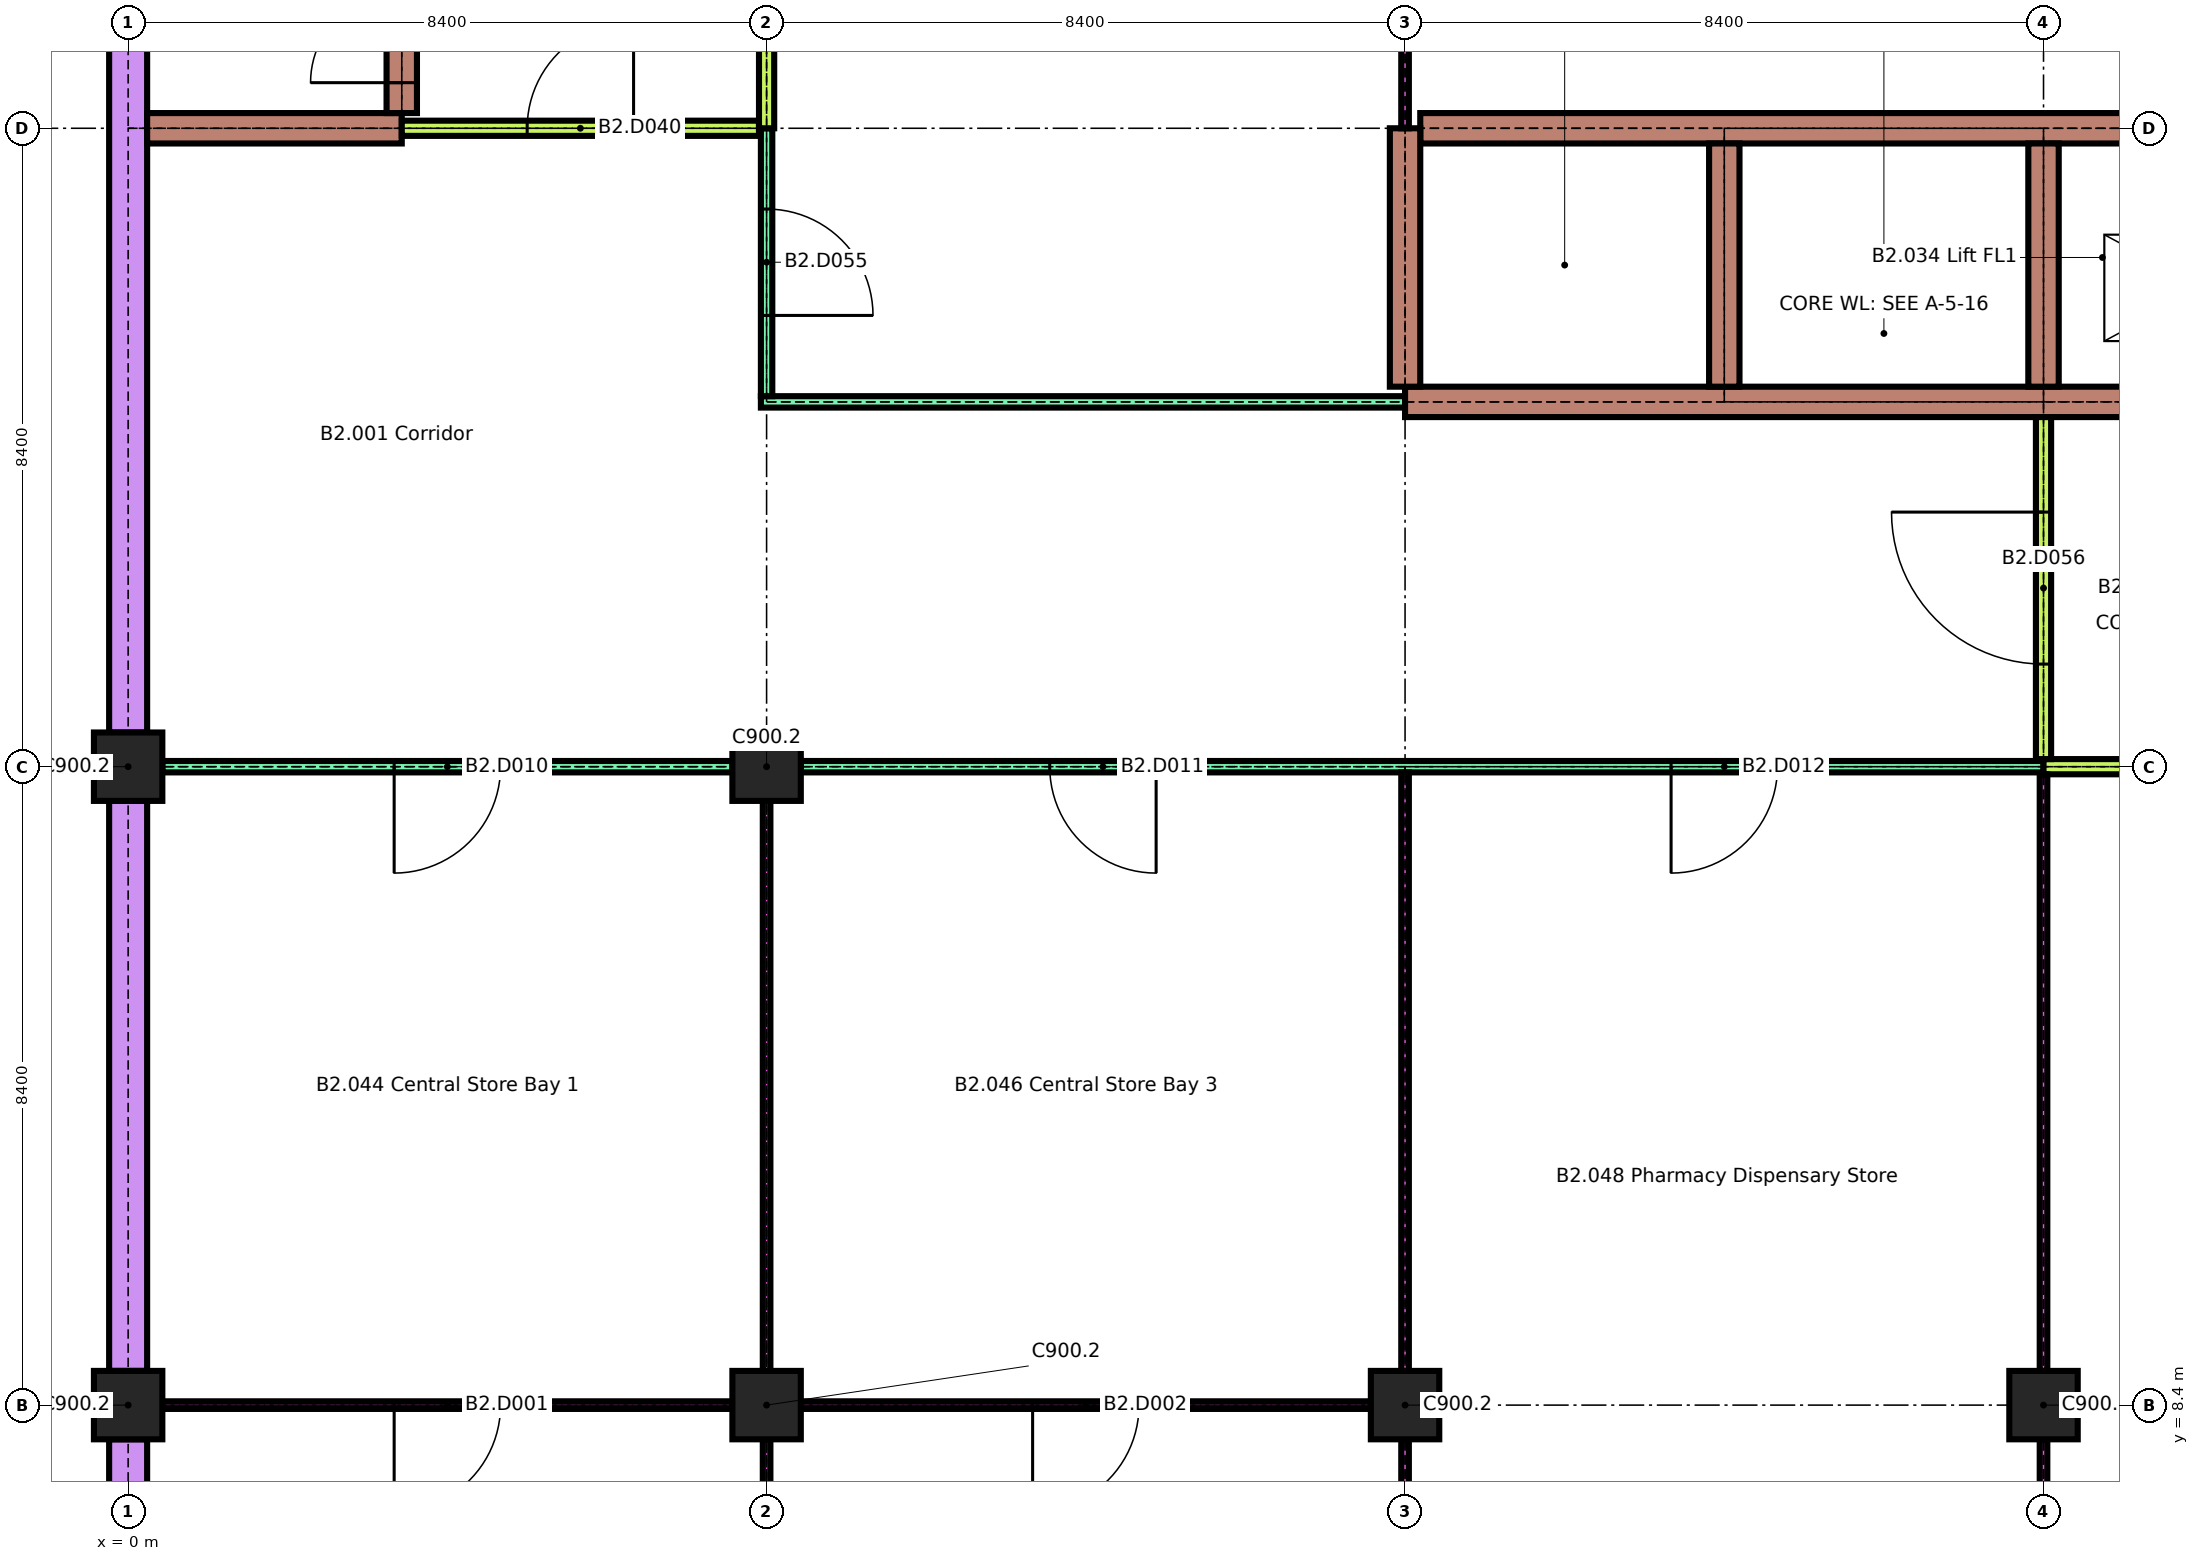
"""IFC4 building model, lengths in metres.
Left out: names, types, materials, properties, quantities, classifications, styles, units other than length and angle.
Written with IfcOpenShell. Run it as: python <this file> out.ifc"""

import sys

from ifc_helpers import new_model, si_unit, direction, frame, frame_2d, origin, origin_2d, place, context, subcontext, project, spatial, rectangle, extrude, element, fill, save


model = new_model("IFC4")
c1 = context("Model", 3, precision=1e-05, world=origin(), true_north=direction((0.0, 1.0)))
c2 = subcontext(c1, "Body", "Model", "MODEL_VIEW")
j1 = project(units=[si_unit("LENGTHUNIT", "METRE"), si_unit("PLANEANGLEUNIT", "RADIAN")], contexts=[c1])
p1 = place(None, origin())
s1 = spatial("IfcSite", under=j1, at=p1, CompositionType="ELEMENT")
p2 = place(p1, origin())
s2 = spatial("IfcBuilding", under=s1, at=p2, CompositionType="ELEMENT")
p3 = place(p2, frame((0.0, 0.0, -7.8)))
s3 = spatial("IfcBuildingStorey", under=s2, at=p3, CompositionType="ELEMENT", Elevation=-7.8)
for number, where, z_axis, x_axis in (
    (1, (0.0, 8.4, 0.0), (0.0, 0.0, 1.0), (1.0, 0.0, 0.0)),
    (2, (8.4, 8.4, 0.0), (0.0, 0.0, 1.0), (1.0, 0.0, 0.0)),
    (3, (16.8, 8.4, 0.0), (0.0, 0.0, 1.0), (1.0, 0.0, 0.0)),
    (4, (25.2, 8.4, 0.0), (0.0, 0.0, 1.0), (1.0, 0.0, 0.0)),
    (5, (0.0, 16.8, 0.0), (0.0, 0.0, 1.0), (1.0, 0.0, 0.0)),
    (6, (8.4, 16.8, 0.0), (0.0, 0.0, 1.0), (1.0, 0.0, 0.0)),
):
    element("IfcColumn", number, at=place(p3, frame(where, z_axis=z_axis, x_axis=x_axis)), inside=s3, PredefinedType="COLUMN", context=c2, shape_type="SweptSolid", body=[
        extrude(rectangle(XDim=0.9, YDim=0.9, at=origin_2d()), origin(), (0.0, 0.0, 1.0), 3.1),
    ])
for number, where, z_axis, x_axis in (
    (7, (0.0, 0.45, 0.0), (0.0, 0.0, 1.0), (0.0, 1.0, 0.0)),
    (8, (0.0, 8.85, 0.0), (0.0, 0.0, 1.0), (0.0, 1.0, 0.0)),
):
    element("IfcWall", number, at=place(p3, frame(where, z_axis=z_axis, x_axis=x_axis)), inside=s3, PredefinedType="SOLIDWALL", context=c2, shape_type="SweptSolid", body=[
        extrude(rectangle(XDim=7.5, YDim=0.5, at=frame_2d((3.75, 0.0))), origin(), (0.0, 0.0, 1.0), 3.1),
    ])
p4 = place(p3, frame((0.0, 17.25, 0.0), z_axis=(0.0, 0.0, 1.0), x_axis=(0.0, 1.0, 0.0)))
e9 = element("IfcWall", 9, at=p4, inside=s3, PredefinedType="SOLIDWALL", context=c2, shape_type="SweptSolid", body=[
    extrude(rectangle(XDim=16.6, YDim=0.5, at=frame_2d((8.3, 0.0))), origin(), (0.0, 0.0, 1.0), 3.1),
])
p5 = place(p3, frame((0.45, 8.4, 0.0), z_axis=(0.0, 0.0, 1.0), x_axis=(1.0, 0.0, 0.0)))
e10 = element("IfcWall", 10, at=p5, inside=s3, PredefinedType="PARTITIONING", context=c2, shape_type="SweptSolid", body=[
    extrude(rectangle(XDim=7.5, YDim=0.1, at=frame_2d((3.75, 0.0))), origin(), (0.0, 0.0, 1.0), 3.1),
])
p6 = place(p5, frame((3.05, 0.0, 0.0)))
e11 = element("IfcOpeningElement", 11, at=p6, cuts=e10, PredefinedType="OPENING", context=c2, shape_type="SweptSolid", body=[
    extrude(rectangle(XDim=1.4, YDim=2.1, at=frame_2d((0.7, 1.05))), frame((0.0, 0.06, 0.0), z_axis=(0.0, -1.0, 0.0), x_axis=(1.0, 0.0, 0.0)), (0.0, 0.0, 1.0), 0.12),
])
p7 = place(p3, frame((8.85, 8.4, 0.0), z_axis=(0.0, 0.0, 1.0), x_axis=(1.0, 0.0, 0.0)))
e12 = element("IfcWall", 12, at=p7, inside=s3, PredefinedType="PARTITIONING", context=c2, shape_type="SweptSolid", body=[
    extrude(rectangle(XDim=7.5, YDim=0.1, at=frame_2d((3.75, 0.0))), origin(), (0.0, 0.0, 1.0), 3.1),
])
p8 = place(p7, frame((3.05, 0.0, 0.0)))
e13 = element("IfcOpeningElement", 13, at=p8, cuts=e12, PredefinedType="OPENING", context=c2, shape_type="SweptSolid", body=[
    extrude(rectangle(XDim=1.4, YDim=2.1, at=frame_2d((0.7, 1.05))), frame((0.0, 0.06, 0.0), z_axis=(0.0, -1.0, 0.0), x_axis=(1.0, 0.0, 0.0)), (0.0, 0.0, 1.0), 0.12),
])
p9 = place(p3, frame((0.45, 16.8, 0.0), z_axis=(0.0, 0.0, 1.0), x_axis=(1.0, 0.0, 0.0)))
e14 = element("IfcWall", 14, at=p9, inside=s3, PredefinedType="PARTITIONING", context=c2, shape_type="SweptSolid", body=[
    extrude(rectangle(XDim=7.5, YDim=0.15, at=frame_2d((3.75, 0.0))), origin(), (0.0, 0.0, 1.0), 3.1),
])
p10 = place(p9, frame((3.05, 0.0, 0.0)))
e15 = element("IfcOpeningElement", 15, at=p10, cuts=e14, PredefinedType="OPENING", context=c2, shape_type="SweptSolid", body=[
    extrude(rectangle(XDim=1.4, YDim=2.1, at=frame_2d((0.7, 1.05))), frame((0.0, 0.085, 0.0), z_axis=(0.0, -1.0, 0.0), x_axis=(1.0, 0.0, 0.0)), (0.0, 0.0, 1.0), 0.17),
])
p11 = place(p3, frame((8.85, 16.8, 0.0), z_axis=(0.0, 0.0, 1.0), x_axis=(1.0, 0.0, 0.0)))
e16 = element("IfcWall", 16, at=p11, inside=s3, PredefinedType="PARTITIONING", context=c2, shape_type="SweptSolid", body=[
    extrude(rectangle(XDim=16.35, YDim=0.15, at=frame_2d((8.175, 0.0))), origin(), (0.0, 0.0, 1.0), 3.1),
])
p12 = place(p11, frame((3.275, 0.0, 0.0)))
e17 = element("IfcOpeningElement", 17, at=p12, cuts=e16, PredefinedType="OPENING", context=c2, shape_type="SweptSolid", body=[
    extrude(rectangle(XDim=1.4, YDim=2.1, at=frame_2d((0.7, 1.05))), frame((0.0, 0.085, 0.0), z_axis=(0.0, -1.0, 0.0), x_axis=(1.0, 0.0, 0.0)), (0.0, 0.0, 1.0), 0.17),
])
p13 = place(p11, frame((11.45, 0.0, 0.0)))
e18 = element("IfcOpeningElement", 18, at=p13, cuts=e16, PredefinedType="OPENING", context=c2, shape_type="SweptSolid", body=[
    extrude(rectangle(XDim=1.4, YDim=2.1, at=frame_2d((0.7, 1.05))), frame((0.0, 0.085, 0.0), z_axis=(0.0, -1.0, 0.0), x_axis=(1.0, 0.0, 0.0)), (0.0, 0.0, 1.0), 0.17),
])
p14 = place(p3, frame((25.2, 16.8, 0.0), z_axis=(0.0, 0.0, 1.0), x_axis=(1.0, 0.0, 0.0)))
e19 = element("IfcWall", 19, at=p14, inside=s3, PredefinedType="PARTITIONING", context=c2, shape_type="SweptSolid", body=[
    extrude(rectangle(XDim=4.2, YDim=0.2, at=frame_2d((2.1, 0.0))), origin(), (0.0, 0.0, 1.0), 3.1),
])
p15 = place(p3, frame((8.325, 21.6, 0.0), z_axis=(0.0, 0.0, 1.0), x_axis=(1.0, 0.0, 0.0)))
e20 = element("IfcWall", 20, at=p15, inside=s3, PredefinedType="PARTITIONING", context=c2, shape_type="SweptSolid", body=[
    extrude(rectangle(XDim=8.475, YDim=0.15, at=frame_2d((4.238, 0.0))), origin(), (0.0, 0.0, 1.0), 3.1),
])
p16 = place(p3, frame((16.8, 21.6, 0.0), z_axis=(0.0, 0.0, 1.0), x_axis=(1.0, 0.0, 0.0)))
e21 = element("IfcWall", 21, at=p16, inside=s3, PredefinedType="SHEAR", context=c2, shape_type="SweptSolid", body=[
    extrude(rectangle(XDim=12.6, YDim=0.4, at=frame_2d((6.3, 0.0))), origin(), (0.0, 0.0, 1.0), 3.1),
])
p17 = place(p16, frame((9.95, 0.0, 0.0)))
e22 = element("IfcOpeningElement", 22, at=p17, cuts=e21, PredefinedType="OPENING", context=c2, shape_type="SweptSolid", body=[
    extrude(rectangle(XDim=1.1, YDim=2.1, at=frame_2d((0.55, 1.05))), frame((0.0, 0.21, 0.0), z_axis=(0.0, -1.0, 0.0), x_axis=(1.0, 0.0, 0.0)), (0.0, 0.0, 1.0), 0.42),
])
p18 = place(p3, frame((0.25, 25.2, 0.0), z_axis=(0.0, 0.0, 1.0), x_axis=(1.0, 0.0, 0.0)))
e23 = element("IfcWall", 23, at=p18, inside=s3, PredefinedType="SHEAR", context=c2, shape_type="SweptSolid", body=[
    extrude(rectangle(XDim=3.35, YDim=0.4, at=frame_2d((1.675, 0.0))), origin(), (0.0, 0.0, 1.0), 3.1),
])
p19 = place(p3, frame((3.6, 25.2, 0.0), z_axis=(0.0, 0.0, 1.0), x_axis=(1.0, 0.0, 0.0)))
e24 = element("IfcWall", 24, at=p19, inside=s3, PredefinedType="PARTITIONING", context=c2, shape_type="SweptSolid", body=[
    extrude(rectangle(XDim=4.7, YDim=0.2, at=frame_2d((2.35, 0.0))), origin(), (0.0, 0.0, 1.0), 3.1),
])
p20 = place(p19, frame((1.65, 0.0, 0.0)))
e25 = element("IfcOpeningElement", 25, at=p20, cuts=e24, PredefinedType="OPENING", context=c2, shape_type="SweptSolid", body=[
    extrude(rectangle(XDim=1.4, YDim=2.1, at=frame_2d((0.7, 1.05))), frame((0.0, 0.11, 0.0), z_axis=(0.0, -1.0, 0.0), x_axis=(1.0, 0.0, 0.0)), (0.0, 0.0, 1.0), 0.22),
])
p21 = place(p3, frame((17.0, 25.2, 0.0), z_axis=(0.0, 0.0, 1.0), x_axis=(1.0, 0.0, 0.0)))
e26 = element("IfcWall", 26, at=p21, inside=s3, PredefinedType="SHEAR", context=c2, shape_type="SweptSolid", body=[
    extrude(rectangle(XDim=12.6, YDim=0.4, at=frame_2d((6.3, 0.0))), origin(), (0.0, 0.0, 1.0), 3.1),
])
p22 = place(p3, frame((3.6, 25.4, 0.0), z_axis=(0.0, 0.0, 1.0), x_axis=(0.0, 1.0, 0.0)))
e27 = element("IfcWall", 27, at=p22, inside=s3, PredefinedType="SHEAR", context=c2, shape_type="SweptSolid", body=[
    extrude(rectangle(XDim=7.95, YDim=0.4, at=frame_2d((3.975, 0.0))), origin(), (0.0, 0.0, 1.0), 3.1),
])
p23 = place(p22, frame((0.4, 0.0, 0.0)))
e28 = element("IfcOpeningElement", 28, at=p23, cuts=e27, PredefinedType="OPENING", context=c2, shape_type="SweptSolid", body=[
    extrude(rectangle(XDim=1.2, YDim=2.1, at=frame_2d((0.6, 1.05))), frame((0.0, 0.21, 0.0), z_axis=(0.0, -1.0, 0.0), x_axis=(1.0, 0.0, 0.0)), (0.0, 0.0, 1.0), 0.42),
])
for number, where, z_axis, x_axis in (
    (29, (8.4, 0.45, 0.0), (0.0, 0.0, 1.0), (0.0, 1.0, 0.0)),
    (30, (8.4, 8.85, 0.0), (0.0, 0.0, 1.0), (0.0, 1.0, 0.0)),
):
    element("IfcWall", number, at=place(p3, frame(where, z_axis=z_axis, x_axis=x_axis)), inside=s3, PredefinedType="PARTITIONING", context=c2, shape_type="SweptSolid", body=[
        extrude(rectangle(XDim=7.5, YDim=0.1, at=frame_2d((3.75, 0.0))), origin(), (0.0, 0.0, 1.0), 3.1),
    ])
p24 = place(p3, frame((8.4, 21.675, 0.0), z_axis=(0.0, 0.0, 1.0), x_axis=(0.0, 1.0, 0.0)))
e31 = element("IfcWall", 31, at=p24, inside=s3, PredefinedType="PARTITIONING", context=c2, shape_type="SweptSolid", body=[
    extrude(rectangle(XDim=3.525, YDim=0.15, at=frame_2d((1.762, 0.0))), origin(), (0.0, 0.0, 1.0), 3.1),
])
p25 = place(p24, frame((1.062, 0.0, 0.0)))
e32 = element("IfcOpeningElement", 32, at=p25, cuts=e31, PredefinedType="OPENING", context=c2, shape_type="SweptSolid", body=[
    extrude(rectangle(XDim=1.4, YDim=2.1, at=frame_2d((0.7, 1.05))), frame((0.0, 0.085, 0.0), z_axis=(0.0, -1.0, 0.0), x_axis=(1.0, 0.0, 0.0)), (0.0, 0.0, 1.0), 0.17),
])
p26 = place(p3, frame((8.4, 25.2, 0.0), z_axis=(0.0, 0.0, 1.0), x_axis=(0.0, 1.0, 0.0)))
e33 = element("IfcWall", 33, at=p26, inside=s3, PredefinedType="PARTITIONING", context=c2, shape_type="SweptSolid", body=[
    extrude(rectangle(XDim=8.15, YDim=0.2, at=frame_2d((4.075, 0.0))), origin(), (0.0, 0.0, 1.0), 3.1),
])
p27 = place(p3, frame((16.8, 0.45, 0.0), z_axis=(0.0, 0.0, 1.0), x_axis=(0.0, 1.0, 0.0)))
e34 = element("IfcWall", 34, at=p27, inside=s3, PredefinedType="PARTITIONING", context=c2, shape_type="SweptSolid", body=[
    extrude(rectangle(XDim=7.5, YDim=0.1, at=frame_2d((3.75, 0.0))), origin(), (0.0, 0.0, 1.0), 3.1),
])
p28 = place(p3, frame((16.8, 8.85, 0.0), z_axis=(0.0, 0.0, 1.0), x_axis=(0.0, 1.0, 0.0)))
e35 = element("IfcWall", 35, at=p28, inside=s3, PredefinedType="PARTITIONING", context=c2, shape_type="SweptSolid", body=[
    extrude(rectangle(XDim=7.875, YDim=0.1, at=frame_2d((3.938, 0.0))), origin(), (0.0, 0.0, 1.0), 3.1),
])
p29 = place(p3, frame((16.8, 21.8, 0.0), z_axis=(0.0, 0.0, 1.0), x_axis=(0.0, 1.0, 0.0)))
e36 = element("IfcWall", 36, at=p29, inside=s3, PredefinedType="SHEAR", context=c2, shape_type="SweptSolid", body=[
    extrude(rectangle(XDim=3.4, YDim=0.4, at=frame_2d((1.7, 0.0))), origin(), (0.0, 0.0, 1.0), 3.1),
])
p30 = place(p3, frame((16.8, 25.2, 0.0), z_axis=(0.0, 0.0, 1.0), x_axis=(0.0, 1.0, 0.0)))
e37 = element("IfcWall", 37, at=p30, inside=s3, PredefinedType="PARTITIONING", context=c2, shape_type="SweptSolid", body=[
    extrude(rectangle(XDim=7.95, YDim=0.1, at=frame_2d((3.975, 0.0))), origin(), (0.0, 0.0, 1.0), 3.1),
])
p31 = place(p3, frame((21.0, 21.8, 0.0), z_axis=(0.0, 0.0, 1.0), x_axis=(0.0, 1.0, 0.0)))
e38 = element("IfcWall", 38, at=p31, inside=s3, PredefinedType="SHEAR", context=c2, shape_type="SweptSolid", body=[
    extrude(rectangle(XDim=3.2, YDim=0.4, at=frame_2d((1.6, 0.0))), origin(), (0.0, 0.0, 1.0), 3.1),
])
p32 = place(p3, frame((25.2, 0.45, 0.0), z_axis=(0.0, 0.0, 1.0), x_axis=(0.0, 1.0, 0.0)))
e39 = element("IfcWall", 39, at=p32, inside=s3, PredefinedType="PARTITIONING", context=c2, shape_type="SweptSolid", body=[
    extrude(rectangle(XDim=7.5, YDim=0.1, at=frame_2d((3.75, 0.0))), origin(), (0.0, 0.0, 1.0), 3.1),
])
p33 = place(p3, frame((25.2, 8.85, 0.0), z_axis=(0.0, 0.0, 1.0), x_axis=(0.0, 1.0, 0.0)))
e40 = element("IfcWall", 40, at=p33, inside=s3, PredefinedType="PARTITIONING", context=c2, shape_type="SweptSolid", body=[
    extrude(rectangle(XDim=7.85, YDim=0.1, at=frame_2d((3.925, 0.0))), origin(), (0.0, 0.0, 1.0), 3.1),
])
p34 = place(p3, frame((25.2, 16.9, 0.0), z_axis=(0.0, 0.0, 1.0), x_axis=(0.0, 1.0, 0.0)))
e41 = element("IfcWall", 41, at=p34, inside=s3, PredefinedType="PARTITIONING", context=c2, shape_type="SweptSolid", body=[
    extrude(rectangle(XDim=4.5, YDim=0.2, at=frame_2d((2.25, 0.0))), origin(), (0.0, 0.0, 1.0), 3.1),
])
p35 = place(p34, frame((1.25, 0.0, 0.0)))
e42 = element("IfcOpeningElement", 42, at=p35, cuts=e41, PredefinedType="OPENING", context=c2, shape_type="SweptSolid", body=[
    extrude(rectangle(XDim=2.0, YDim=2.4, at=frame_2d((1.0, 1.2))), frame((0.0, 0.11, 0.0), z_axis=(0.0, -1.0, 0.0), x_axis=(1.0, 0.0, 0.0)), (0.0, 0.0, 1.0), 0.22),
])
p36 = place(p3, frame((25.2, 21.8, 0.0), z_axis=(0.0, 0.0, 1.0), x_axis=(0.0, 1.0, 0.0)))
e43 = element("IfcWall", 43, at=p36, inside=s3, PredefinedType="SHEAR", context=c2, shape_type="SweptSolid", body=[
    extrude(rectangle(XDim=3.2, YDim=0.4, at=frame_2d((1.6, 0.0))), origin(), (0.0, 0.0, 1.0), 3.1),
])
p37 = place(p6, origin())
e44 = element("IfcDoor", 44, at=p37, inside=s3, OperationType="SINGLE_SWING_LEFT", PredefinedType="DOOR", context=c2, shape_type="SweptSolid", body=[
    extrude(rectangle(XDim=1.4, YDim=2.1, at=frame_2d((0.7, 1.05))), frame((0.0, 0.025, 0.0), z_axis=(0.0, -1.0, 0.0), x_axis=(1.0, 0.0, 0.0)), (0.0, 0.0, 1.0), 0.05),
])
fill(e11, e44)
p38 = place(p8, origin())
e45 = element("IfcDoor", 45, at=p38, inside=s3, OperationType="SINGLE_SWING_LEFT", PredefinedType="DOOR", context=c2, shape_type="SweptSolid", body=[
    extrude(rectangle(XDim=1.4, YDim=2.1, at=frame_2d((0.7, 1.05))), frame((0.0, 0.025, 0.0), z_axis=(0.0, -1.0, 0.0), x_axis=(1.0, 0.0, 0.0)), (0.0, 0.0, 1.0), 0.05),
])
fill(e13, e45)
p39 = place(p10, origin())
e46 = element("IfcDoor", 46, at=p39, inside=s3, OperationType="SINGLE_SWING_LEFT", PredefinedType="DOOR", context=c2, shape_type="SweptSolid", body=[
    extrude(rectangle(XDim=1.4, YDim=2.1, at=frame_2d((0.7, 1.05))), frame((0.0, 0.025, 0.0), z_axis=(0.0, -1.0, 0.0), x_axis=(1.0, 0.0, 0.0)), (0.0, 0.0, 1.0), 0.05),
])
fill(e15, e46)
p40 = place(p12, origin())
e47 = element("IfcDoor", 47, at=p40, inside=s3, OperationType="SINGLE_SWING_RIGHT", PredefinedType="DOOR", context=c2, shape_type="SweptSolid", body=[
    extrude(rectangle(XDim=1.4, YDim=2.1, at=frame_2d((0.7, 1.05))), frame((0.0, 0.025, 0.0), z_axis=(0.0, -1.0, 0.0), x_axis=(1.0, 0.0, 0.0)), (0.0, 0.0, 1.0), 0.05),
])
fill(e17, e47)
p41 = place(p13, origin())
e48 = element("IfcDoor", 48, at=p41, inside=s3, OperationType="SINGLE_SWING_LEFT", PredefinedType="DOOR", context=c2, shape_type="SweptSolid", body=[
    extrude(rectangle(XDim=1.4, YDim=2.1, at=frame_2d((0.7, 1.05))), frame((0.0, 0.025, 0.0), z_axis=(0.0, -1.0, 0.0), x_axis=(1.0, 0.0, 0.0)), (0.0, 0.0, 1.0), 0.05),
])
fill(e18, e48)
p42 = place(p20, origin())
e49 = element("IfcDoor", 49, at=p42, inside=s3, OperationType="SINGLE_SWING_LEFT", PredefinedType="DOOR", context=c2, shape_type="SweptSolid", body=[
    extrude(rectangle(XDim=1.4, YDim=2.1, at=frame_2d((0.7, 1.05))), frame((0.0, 0.03, 0.0), z_axis=(0.0, -1.0, 0.0), x_axis=(1.0, 0.0, 0.0)), (0.0, 0.0, 1.0), 0.06),
])
fill(e25, e49)
p43 = place(p23, origin())
e50 = element("IfcDoor", 50, at=p43, inside=s3, OperationType="SINGLE_SWING_RIGHT", PredefinedType="DOOR", context=c2, shape_type="SweptSolid", body=[
    extrude(rectangle(XDim=1.2, YDim=2.1, at=frame_2d((0.6, 1.05))), frame((0.0, 0.025, 0.0), z_axis=(0.0, -1.0, 0.0), x_axis=(1.0, 0.0, 0.0)), (0.0, 0.0, 1.0), 0.05),
])
fill(e28, e50)
p44 = place(p25, origin())
e51 = element("IfcDoor", 51, at=p44, inside=s3, OperationType="SINGLE_SWING_LEFT", PredefinedType="DOOR", context=c2, shape_type="SweptSolid", body=[
    extrude(rectangle(XDim=1.4, YDim=2.1, at=frame_2d((0.7, 1.05))), frame((0.0, 0.025, 0.0), z_axis=(0.0, -1.0, 0.0), x_axis=(1.0, 0.0, 0.0)), (0.0, 0.0, 1.0), 0.05),
])
fill(e32, e51)
p45 = place(p35, origin())
e52 = element("IfcDoor", 52, at=p45, inside=s3, OperationType="SINGLE_SWING_LEFT", PredefinedType="DOOR", context=c2, shape_type="SweptSolid", body=[
    extrude(rectangle(XDim=2.0, YDim=2.4, at=frame_2d((1.0, 1.2))), frame((0.0, 0.03, 0.0), z_axis=(0.0, -1.0, 0.0), x_axis=(1.0, 0.0, 0.0)), (0.0, 0.0, 1.0), 0.06),
])
fill(e42, e52)
save(model, sys.argv[1])
